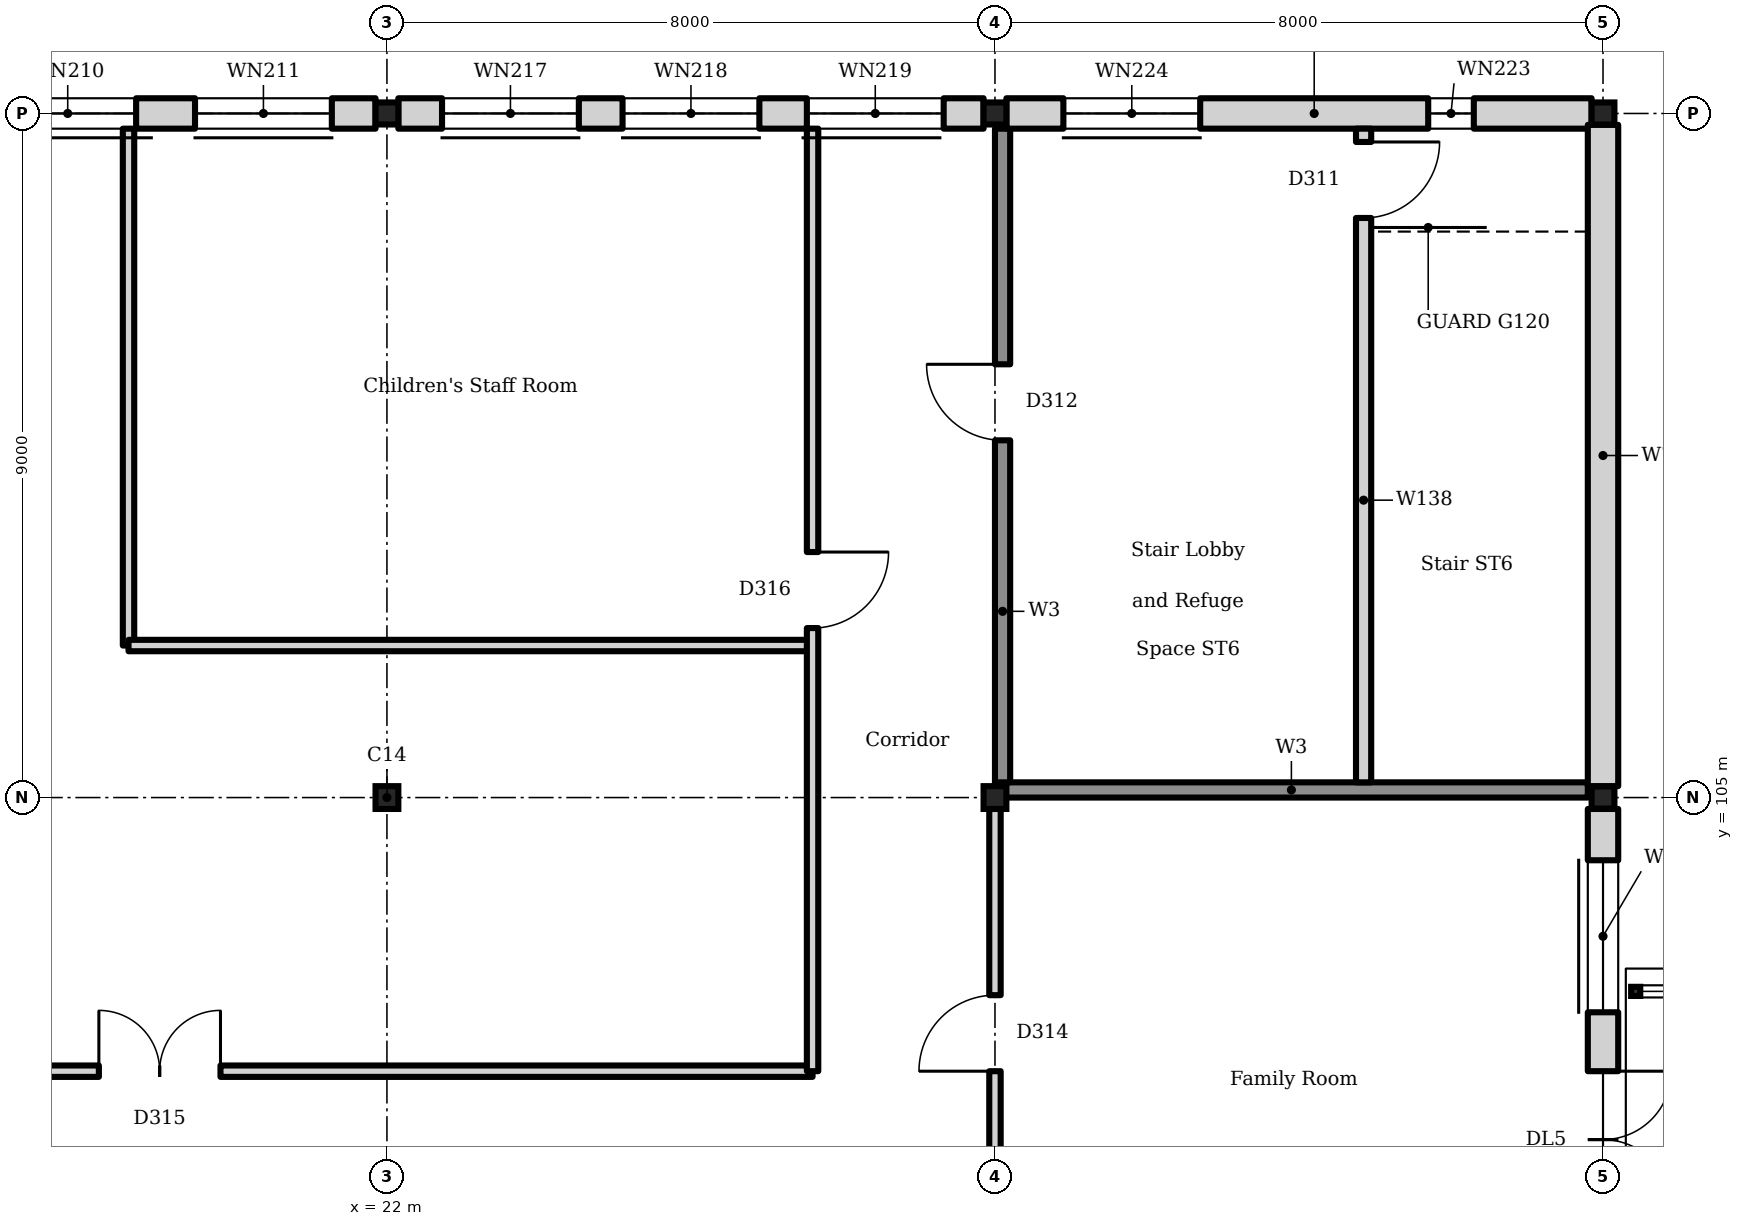
"""IFC4 building model, lengths in metres.
Left out: names, types, materials, properties, quantities, classifications, styles, units other than length and angle.
Written with IfcOpenShell. Run it as: python <this file> out.ifc"""

import sys

from ifc_helpers import new_model, si_unit, direction, frame, frame_2d, origin, origin_2d, place, context, subcontext, project, spatial, rectangle, i_section, extrude, element, fill, save


model = new_model("IFC4")
c1 = context("Model", 3, precision=1e-05, world=origin(), true_north=direction((0.0, 1.0)))
c2 = subcontext(c1, "Body", "Model", "MODEL_VIEW")
j1 = project(units=[si_unit("LENGTHUNIT", "METRE"), si_unit("PLANEANGLEUNIT", "RADIAN")], contexts=[c1])
p1 = place(None, origin())
s1 = spatial("IfcSite", under=j1, at=p1, CompositionType="ELEMENT")
p2 = place(p1, origin())
s2 = spatial("IfcBuilding", under=s1, at=p2, CompositionType="ELEMENT")
p3 = place(p2, frame((0.0, 0.0, 9.9)))
s3 = spatial("IfcBuildingStorey", under=s2, at=p3, CompositionType="ELEMENT", Elevation=9.9)
p4 = place(p3, frame((22.0, 105.0, 0.0), z_axis=(0.0, 0.0, 1.0), x_axis=(1.0, 0.0, 0.0)))
e1 = element("IfcColumn", 1, at=p4, inside=s3, PredefinedType="COLUMN", context=c2, shape_type="SweptSolid", body=[
    extrude(i_section(OverallWidth=0.3, OverallDepth=0.3, WebThickness=0.011, FlangeThickness=0.019, FilletRadius=0.027, at=origin_2d()), origin(), (0.0, 0.0, 1.0), 4.5),
])
p5 = place(p3, frame((22.0, 114.0, 0.0), z_axis=(0.0, 0.0, 1.0), x_axis=(1.0, 0.0, 0.0)))
e2 = element("IfcColumn", 2, at=p5, inside=s3, PredefinedType="COLUMN", context=c2, shape_type="SweptSolid", body=[
    extrude(i_section(OverallWidth=0.3, OverallDepth=0.29, WebThickness=0.009, FlangeThickness=0.014, FilletRadius=0.027, at=origin_2d()), origin(), (0.0, 0.0, 1.0), 4.5),
])
p6 = place(p3, frame((30.0, 105.0, 0.0), z_axis=(0.0, 0.0, 1.0), x_axis=(1.0, 0.0, 0.0)))
e3 = element("IfcColumn", 3, at=p6, inside=s3, PredefinedType="COLUMN", context=c2, shape_type="SweptSolid", body=[
    extrude(i_section(OverallWidth=0.3, OverallDepth=0.3, WebThickness=0.011, FlangeThickness=0.019, FilletRadius=0.027, at=origin_2d()), origin(), (0.0, 0.0, 1.0), 4.5),
])
for number, where, z_axis, x_axis in (
    (4, (30.0, 114.0, 0.0), (0.0, 0.0, 1.0), (1.0, 0.0, 0.0)),
    (5, (38.0, 105.0, 0.0), (0.0, 0.0, 1.0), (1.0, 0.0, 0.0)),
    (6, (38.0, 114.0, 0.0), (0.0, 0.0, 1.0), (1.0, 0.0, 0.0)),
):
    element("IfcColumn", number, at=place(p3, frame(where, z_axis=z_axis, x_axis=x_axis)), inside=s3, PredefinedType="COLUMN", context=c2, shape_type="SweptSolid", body=[
        extrude(i_section(OverallWidth=0.3, OverallDepth=0.29, WebThickness=0.009, FlangeThickness=0.014, FilletRadius=0.027, at=origin_2d()), origin(), (0.0, 0.0, 1.0), 4.5),
    ])
p7 = place(p3, frame((14.15, 114.0, 0.0), z_axis=(0.0, 0.0, 1.0), x_axis=(1.0, 0.0, 0.0)))
e7 = element("IfcWall", 7, at=p7, inside=s3, PredefinedType="SOLIDWALL", context=c2, shape_type="SweptSolid", body=[
    extrude(rectangle(XDim=7.7, YDim=0.4, at=frame_2d((3.85, 0.0))), origin(), (0.0, 0.0, 1.0), 3.93),
])
p8 = place(p7, frame((0.575, 0.0, 0.45)))
e8 = element("IfcOpeningElement", 8, at=p8, cuts=e7, PredefinedType="OPENING", context=c2, shape_type="SweptSolid", body=[
    extrude(rectangle(XDim=1.8, YDim=3.0, at=frame_2d((0.9, 1.5))), frame((0.0, 0.21, 0.0), z_axis=(0.0, -1.0, 0.0), x_axis=(1.0, 0.0, 0.0)), (0.0, 0.0, 1.0), 0.42),
])
p9 = place(p7, frame((2.75, 0.0, 0.45)))
e9 = element("IfcOpeningElement", 9, at=p9, cuts=e7, PredefinedType="OPENING", context=c2, shape_type="SweptSolid", body=[
    extrude(rectangle(XDim=1.8, YDim=3.0, at=frame_2d((0.9, 1.5))), frame((0.0, 0.21, 0.0), z_axis=(0.0, -1.0, 0.0), x_axis=(1.0, 0.0, 0.0)), (0.0, 0.0, 1.0), 0.42),
])
p10 = place(p7, frame((5.325, 0.0, 0.45)))
e10 = element("IfcOpeningElement", 10, at=p10, cuts=e7, PredefinedType="OPENING", context=c2, shape_type="SweptSolid", body=[
    extrude(rectangle(XDim=1.8, YDim=3.0, at=frame_2d((0.9, 1.5))), frame((0.0, 0.21, 0.0), z_axis=(0.0, -1.0, 0.0), x_axis=(1.0, 0.0, 0.0)), (0.0, 0.0, 1.0), 0.42),
])
p11 = place(p3, frame((22.15, 114.0, 0.0), z_axis=(0.0, 0.0, 1.0), x_axis=(1.0, 0.0, 0.0)))
e11 = element("IfcWall", 11, at=p11, inside=s3, PredefinedType="SOLIDWALL", context=c2, shape_type="SweptSolid", body=[
    extrude(rectangle(XDim=7.7, YDim=0.4, at=frame_2d((3.85, 0.0))), origin(), (0.0, 0.0, 1.0), 3.93),
])
p12 = place(p11, frame((0.575, 0.0, 0.45)))
e12 = element("IfcOpeningElement", 12, at=p12, cuts=e11, PredefinedType="OPENING", context=c2, shape_type="SweptSolid", body=[
    extrude(rectangle(XDim=1.8, YDim=3.0, at=frame_2d((0.9, 1.5))), frame((0.0, 0.21, 0.0), z_axis=(0.0, -1.0, 0.0), x_axis=(1.0, 0.0, 0.0)), (0.0, 0.0, 1.0), 0.42),
])
p13 = place(p11, frame((2.95, 0.0, 0.45)))
e13 = element("IfcOpeningElement", 13, at=p13, cuts=e11, PredefinedType="OPENING", context=c2, shape_type="SweptSolid", body=[
    extrude(rectangle(XDim=1.8, YDim=3.0, at=frame_2d((0.9, 1.5))), frame((0.0, 0.21, 0.0), z_axis=(0.0, -1.0, 0.0), x_axis=(1.0, 0.0, 0.0)), (0.0, 0.0, 1.0), 0.42),
])
p14 = place(p11, frame((5.375, 0.0, 0.45)))
e14 = element("IfcOpeningElement", 14, at=p14, cuts=e11, PredefinedType="OPENING", context=c2, shape_type="SweptSolid", body=[
    extrude(rectangle(XDim=1.8, YDim=3.0, at=frame_2d((0.9, 1.5))), frame((0.0, 0.21, 0.0), z_axis=(0.0, -1.0, 0.0), x_axis=(1.0, 0.0, 0.0)), (0.0, 0.0, 1.0), 0.42),
])
p15 = place(p3, frame((30.15, 114.0, 0.0), z_axis=(0.0, 0.0, 1.0), x_axis=(1.0, 0.0, 0.0)))
e15 = element("IfcWall", 15, at=p15, inside=s3, PredefinedType="SOLIDWALL", context=c2, shape_type="SweptSolid", body=[
    extrude(rectangle(XDim=7.7, YDim=0.4, at=frame_2d((3.85, 0.0))), origin(), (0.0, 0.0, 1.0), 3.93),
])
p16 = place(p15, frame((5.55, 0.0, 1.0)))
e16 = element("IfcOpeningElement", 16, at=p16, cuts=e15, PredefinedType="OPENING", context=c2, shape_type="SweptSolid", body=[
    extrude(rectangle(XDim=0.6, YDim=2.4, at=frame_2d((0.3, 1.2))), frame((0.0, 0.21, 0.0), z_axis=(0.0, -1.0, 0.0), x_axis=(1.0, 0.0, 0.0)), (0.0, 0.0, 1.0), 0.42),
])
p17 = place(p15, frame((0.75, 0.0, 0.45)))
e17 = element("IfcOpeningElement", 17, at=p17, cuts=e15, PredefinedType="OPENING", context=c2, shape_type="SweptSolid", body=[
    extrude(rectangle(XDim=1.8, YDim=3.0, at=frame_2d((0.9, 1.5))), frame((0.0, 0.21, 0.0), z_axis=(0.0, -1.0, 0.0), x_axis=(1.0, 0.0, 0.0)), (0.0, 0.0, 1.0), 0.42),
])
p18 = place(p3, frame((38.0, 96.15, 0.0), z_axis=(0.0, 0.0, 1.0), x_axis=(0.0, 1.0, 0.0)))
e18 = element("IfcWall", 18, at=p18, inside=s3, PredefinedType="SOLIDWALL", context=c2, shape_type="SweptSolid", body=[
    extrude(rectangle(XDim=8.7, YDim=0.4, at=frame_2d((4.35, 0.0))), origin(), (0.0, 0.0, 1.0), 3.88),
])
p19 = place(p18, frame((0.675, 0.0, 0.45)))
e19 = element("IfcOpeningElement", 19, at=p19, cuts=e18, PredefinedType="OPENING", context=c2, shape_type="SweptSolid", body=[
    extrude(rectangle(XDim=2.0, YDim=3.0, at=frame_2d((1.0, 1.5))), frame((0.0, 0.21, 0.0), z_axis=(0.0, -1.0, 0.0), x_axis=(1.0, 0.0, 0.0)), (0.0, 0.0, 1.0), 0.42),
])
p20 = place(p18, frame((3.45, 0.0, 0.0)))
e20 = element("IfcOpeningElement", 20, at=p20, cuts=e18, PredefinedType="OPENING", context=c2, shape_type="SweptSolid", body=[
    extrude(rectangle(XDim=1.8, YDim=2.4, at=frame_2d((0.9, 1.2))), frame((0.0, 0.21, 0.0), z_axis=(0.0, -1.0, 0.0), x_axis=(1.0, 0.0, 0.0)), (0.0, 0.0, 1.0), 0.42),
])
p21 = place(p18, frame((6.025, 0.0, 0.45)))
e21 = element("IfcOpeningElement", 21, at=p21, cuts=e18, PredefinedType="OPENING", context=c2, shape_type="SweptSolid", body=[
    extrude(rectangle(XDim=2.0, YDim=3.0, at=frame_2d((1.0, 1.5))), frame((0.0, 0.21, 0.0), z_axis=(0.0, -1.0, 0.0), x_axis=(1.0, 0.0, 0.0)), (0.0, 0.0, 1.0), 0.42),
])
p22 = place(p3, frame((38.0, 105.15, 0.0), z_axis=(0.0, 0.0, 1.0), x_axis=(0.0, 1.0, 0.0)))
e22 = element("IfcWall", 22, at=p22, inside=s3, PredefinedType="SOLIDWALL", context=c2, shape_type="SweptSolid", body=[
    extrude(rectangle(XDim=8.7, YDim=0.4, at=frame_2d((4.35, 0.0))), origin(), (0.0, 0.0, 1.0), 3.88),
])
p23 = place(p3, frame((34.85, 105.2, 0.0), z_axis=(0.0, 0.0, 1.0), x_axis=(0.0, 1.0, 0.0)))
e23 = element("IfcWall", 23, at=p23, inside=s3, PredefinedType="SOLIDWALL", context=c2, shape_type="SweptSolid", body=[
    extrude(rectangle(XDim=8.6, YDim=0.2, at=frame_2d((4.3, 0.0))), origin(), (0.0, 0.0, 1.0), 4.35),
])
p24 = place(p23, frame((7.425, 0.0, 0.0)))
e24 = element("IfcOpeningElement", 24, at=p24, cuts=e23, PredefinedType="OPENING", context=c2, shape_type="SweptSolid", body=[
    extrude(rectangle(XDim=1.0, YDim=2.1, at=frame_2d((0.5, 1.05))), frame((0.0, 0.11, 0.0), z_axis=(0.0, -1.0, 0.0), x_axis=(1.0, 0.0, 0.0)), (0.0, 0.0, 1.0), 0.22),
])
p25 = place(p3, frame((30.0, 105.1, 0.0), z_axis=(0.0, 0.0, 1.0), x_axis=(1.0, 0.0, 0.0)))
e25 = element("IfcWall", 25, at=p25, inside=s3, PredefinedType="SOLIDWALL", context=c2, shape_type="SweptSolid", body=[
    extrude(rectangle(XDim=7.8, YDim=0.2, at=frame_2d((3.9, 0.0))), origin(), (0.0, 0.0, 1.0), 3.91),
])
p26 = place(p3, frame((30.1, 105.2, 0.0), z_axis=(0.0, 0.0, 1.0), x_axis=(0.0, 1.0, 0.0)))
e26 = element("IfcWall", 26, at=p26, inside=s3, PredefinedType="SOLIDWALL", context=c2, shape_type="SweptSolid", body=[
    extrude(rectangle(XDim=8.6, YDim=0.2, at=frame_2d((4.3, 0.0))), origin(), (0.0, 0.0, 1.0), 3.91),
])
p27 = place(p26, frame((4.5, 0.0, 0.0)))
e27 = element("IfcOpeningElement", 27, at=p27, cuts=e26, PredefinedType="OPENING", context=c2, shape_type="SweptSolid", body=[
    extrude(rectangle(XDim=1.0, YDim=2.1, at=frame_2d((0.5, 1.05))), frame((0.0, 0.11, 0.0), z_axis=(0.0, -1.0, 0.0), x_axis=(1.0, 0.0, 0.0)), (0.0, 0.0, 1.0), 0.22),
])
p28 = place(p3, frame((10.4, 101.4, 0.0), z_axis=(0.0, 0.0, 1.0), x_axis=(1.0, 0.0, 0.0)))
e28 = element("IfcWall", 28, at=p28, inside=s3, PredefinedType="PARTITIONING", context=c2, shape_type="SweptSolid", body=[
    extrude(rectangle(XDim=17.2, YDim=0.15, at=frame_2d((8.6, 0.0))), origin(), (0.0, 0.0, 1.0), 3.91),
])
p29 = place(p28, frame((7.81, 0.0, 0.0)))
e29 = element("IfcOpeningElement", 29, at=p29, cuts=e28, PredefinedType="OPENING", context=c2, shape_type="SweptSolid", body=[
    extrude(rectangle(XDim=1.6, YDim=2.1, at=frame_2d((0.8, 1.05))), frame((0.0, 0.085, 0.0), z_axis=(0.0, -1.0, 0.0), x_axis=(1.0, 0.0, 0.0)), (0.0, 0.0, 1.0), 0.17),
])
p30 = place(p3, frame((18.6, 107.0, 0.0), z_axis=(0.0, 0.0, 1.0), x_axis=(0.0, 1.0, 0.0)))
e30 = element("IfcWall", 30, at=p30, inside=s3, PredefinedType="PARTITIONING", context=c2, shape_type="SweptSolid", body=[
    extrude(rectangle(XDim=6.8, YDim=0.15, at=frame_2d((3.4, 0.0))), origin(), (0.0, 0.0, 1.0), 4.35),
])
p31 = place(p3, frame((18.6, 107.0, 0.0), z_axis=(0.0, 0.0, 1.0), x_axis=(1.0, 0.0, 0.0)))
e31 = element("IfcWall", 31, at=p31, inside=s3, PredefinedType="PARTITIONING", context=c2, shape_type="SweptSolid", body=[
    extrude(rectangle(XDim=9.0, YDim=0.15, at=frame_2d((4.5, 0.0))), origin(), (0.0, 0.0, 1.0), 3.91),
])
p32 = place(p3, frame((27.6, 101.4, 0.0), z_axis=(0.0, 0.0, 1.0), x_axis=(0.0, 1.0, 0.0)))
e32 = element("IfcWall", 32, at=p32, inside=s3, PredefinedType="PARTITIONING", context=c2, shape_type="SweptSolid", body=[
    extrude(rectangle(XDim=12.4, YDim=0.15, at=frame_2d((6.2, 0.0))), origin(), (0.0, 0.0, 1.0), 3.96),
])
p33 = place(p32, frame((5.83, 0.0, 0.0)))
e33 = element("IfcOpeningElement", 33, at=p33, cuts=e32, PredefinedType="OPENING", context=c2, shape_type="SweptSolid", body=[
    extrude(rectangle(XDim=1.0, YDim=2.1, at=frame_2d((0.5, 1.05))), frame((0.0, 0.085, 0.0), z_axis=(0.0, -1.0, 0.0), x_axis=(1.0, 0.0, 0.0)), (0.0, 0.0, 1.0), 0.17),
])
p34 = place(p3, frame((30.0, 99.0, 0.0), z_axis=(0.0, 0.0, 1.0), x_axis=(0.0, 1.0, 0.0)))
e34 = element("IfcWall", 34, at=p34, inside=s3, PredefinedType="PARTITIONING", context=c2, shape_type="SweptSolid", body=[
    extrude(rectangle(XDim=5.85, YDim=0.15, at=frame_2d((2.925, 0.0))), origin(), (0.0, 0.0, 1.0), 3.91),
])
p35 = place(p34, frame((2.4, 0.0, 0.0)))
e35 = element("IfcOpeningElement", 35, at=p35, cuts=e34, PredefinedType="OPENING", context=c2, shape_type="SweptSolid", body=[
    extrude(rectangle(XDim=1.0, YDim=2.1, at=frame_2d((0.5, 1.05))), frame((0.0, 0.085, 0.0), z_axis=(0.0, -1.0, 0.0), x_axis=(1.0, 0.0, 0.0)), (0.0, 0.0, 1.0), 0.17),
])
p36 = place(p9, origin())
e36 = element("IfcWindow", 36, at=p36, inside=s3, PartitioningType="SINGLE_PANEL", PredefinedType="WINDOW", context=c2, shape_type="SweptSolid", body=[
    extrude(rectangle(XDim=1.8, YDim=3.0, at=frame_2d((0.9, 1.5))), frame((0.0, 0.03, 0.0), z_axis=(0.0, -1.0, 0.0), x_axis=(1.0, 0.0, 0.0)), (0.0, 0.0, 1.0), 0.06),
])
fill(e9, e36)
p37 = place(p10, origin())
e37 = element("IfcWindow", 37, at=p37, inside=s3, PartitioningType="SINGLE_PANEL", PredefinedType="WINDOW", context=c2, shape_type="SweptSolid", body=[
    extrude(rectangle(XDim=1.8, YDim=3.0, at=frame_2d((0.9, 1.5))), frame((0.0, 0.03, 0.0), z_axis=(0.0, -1.0, 0.0), x_axis=(1.0, 0.0, 0.0)), (0.0, 0.0, 1.0), 0.06),
])
fill(e10, e37)
p38 = place(p12, origin())
e38 = element("IfcWindow", 38, at=p38, inside=s3, PartitioningType="SINGLE_PANEL", PredefinedType="WINDOW", context=c2, shape_type="SweptSolid", body=[
    extrude(rectangle(XDim=1.8, YDim=3.0, at=frame_2d((0.9, 1.5))), frame((0.0, 0.03, 0.0), z_axis=(0.0, -1.0, 0.0), x_axis=(1.0, 0.0, 0.0)), (0.0, 0.0, 1.0), 0.06),
])
fill(e12, e38)
p39 = place(p13, origin())
e39 = element("IfcWindow", 39, at=p39, inside=s3, PartitioningType="SINGLE_PANEL", PredefinedType="WINDOW", context=c2, shape_type="SweptSolid", body=[
    extrude(rectangle(XDim=1.8, YDim=3.0, at=frame_2d((0.9, 1.5))), frame((0.0, 0.03, 0.0), z_axis=(0.0, -1.0, 0.0), x_axis=(1.0, 0.0, 0.0)), (0.0, 0.0, 1.0), 0.06),
])
fill(e13, e39)
p40 = place(p14, origin())
e40 = element("IfcWindow", 40, at=p40, inside=s3, PartitioningType="SINGLE_PANEL", PredefinedType="WINDOW", context=c2, shape_type="SweptSolid", body=[
    extrude(rectangle(XDim=1.8, YDim=3.0, at=frame_2d((0.9, 1.5))), frame((0.0, 0.03, 0.0), z_axis=(0.0, -1.0, 0.0), x_axis=(1.0, 0.0, 0.0)), (0.0, 0.0, 1.0), 0.06),
])
fill(e14, e40)
p41 = place(p16, origin())
e41 = element("IfcWindow", 41, at=p41, inside=s3, PartitioningType="SINGLE_PANEL", PredefinedType="WINDOW", context=c2, shape_type="SweptSolid", body=[
    extrude(rectangle(XDim=0.6, YDim=2.4, at=frame_2d((0.3, 1.2))), frame((0.0, 0.03, 0.0), z_axis=(0.0, -1.0, 0.0), x_axis=(1.0, 0.0, 0.0)), (0.0, 0.0, 1.0), 0.06),
])
fill(e16, e41)
p42 = place(p17, origin())
e42 = element("IfcWindow", 42, at=p42, inside=s3, PartitioningType="SINGLE_PANEL", PredefinedType="WINDOW", context=c2, shape_type="SweptSolid", body=[
    extrude(rectangle(XDim=1.8, YDim=3.0, at=frame_2d((0.9, 1.5))), frame((0.0, 0.03, 0.0), z_axis=(0.0, -1.0, 0.0), x_axis=(1.0, 0.0, 0.0)), (0.0, 0.0, 1.0), 0.06),
])
fill(e17, e42)
p43 = place(p20, frame((1.8, 0.0, 0.0), z_axis=(0.0, 0.0, 1.0), x_axis=(-1.0, 0.0, 0.0)))
e43 = element("IfcDoor", 43, at=p43, inside=s3, OperationType="DOUBLE_DOOR_SINGLE_SWING", PredefinedType="DOOR", context=c2, shape_type="SweptSolid", body=[
    extrude(rectangle(XDim=1.8, YDim=2.4, at=frame_2d((0.9, 1.2))), frame((0.0, 0.025, 0.0), z_axis=(0.0, -1.0, 0.0), x_axis=(1.0, 0.0, 0.0)), (0.0, 0.0, 1.0), 0.05),
])
fill(e20, e43)
p44 = place(p21, origin())
e44 = element("IfcWindow", 44, at=p44, inside=s3, PartitioningType="SINGLE_PANEL", PredefinedType="WINDOW", context=c2, shape_type="SweptSolid", body=[
    extrude(rectangle(XDim=2.0, YDim=3.0, at=frame_2d((1.0, 1.5))), frame((0.0, 0.03, 0.0), z_axis=(0.0, -1.0, 0.0), x_axis=(1.0, 0.0, 0.0)), (0.0, 0.0, 1.0), 0.06),
])
fill(e21, e44)
p45 = place(p24, frame((1.0, 0.0, 0.0), z_axis=(0.0, 0.0, 1.0), x_axis=(-1.0, 0.0, 0.0)))
e45 = element("IfcDoor", 45, at=p45, inside=s3, OperationType="SINGLE_SWING_RIGHT", PredefinedType="DOOR", context=c2, shape_type="SweptSolid", body=[
    extrude(rectangle(XDim=1.0, YDim=2.1, at=frame_2d((0.5, 1.05))), frame((0.0, 0.025, 0.0), z_axis=(0.0, -1.0, 0.0), x_axis=(1.0, 0.0, 0.0)), (0.0, 0.0, 1.0), 0.05),
])
fill(e24, e45)
p46 = place(p27, origin())
e46 = element("IfcDoor", 46, at=p46, inside=s3, OperationType="SINGLE_SWING_LEFT", PredefinedType="DOOR", context=c2, shape_type="SweptSolid", body=[
    extrude(rectangle(XDim=1.0, YDim=2.1, at=frame_2d((0.5, 1.05))), frame((0.0, 0.025, 0.0), z_axis=(0.0, -1.0, 0.0), x_axis=(1.0, 0.0, 0.0)), (0.0, 0.0, 1.0), 0.05),
])
fill(e27, e46)
p47 = place(p35, origin())
e47 = element("IfcDoor", 47, at=p47, inside=s3, OperationType="SINGLE_SWING_RIGHT", PredefinedType="DOOR", context=c2, shape_type="SweptSolid", body=[
    extrude(rectangle(XDim=1.0, YDim=2.1, at=frame_2d((0.5, 1.05))), frame((0.0, 0.025, 0.0), z_axis=(0.0, -1.0, 0.0), x_axis=(1.0, 0.0, 0.0)), (0.0, 0.0, 1.0), 0.05),
])
fill(e35, e47)
p48 = place(p29, origin())
e48 = element("IfcDoor", 48, at=p48, inside=s3, OperationType="DOUBLE_DOOR_SINGLE_SWING", PredefinedType="DOOR", context=c2, shape_type="SweptSolid", body=[
    extrude(rectangle(XDim=1.6, YDim=2.1, at=frame_2d((0.8, 1.05))), frame((0.0, 0.025, 0.0), z_axis=(0.0, -1.0, 0.0), x_axis=(1.0, 0.0, 0.0)), (0.0, 0.0, 1.0), 0.05),
])
fill(e29, e48)
p49 = place(p33, frame((1.0, 0.0, 0.0), z_axis=(0.0, 0.0, 1.0), x_axis=(-1.0, 0.0, 0.0)))
e49 = element("IfcDoor", 49, at=p49, inside=s3, OperationType="SINGLE_SWING_RIGHT", PredefinedType="DOOR", context=c2, shape_type="SweptSolid", body=[
    extrude(rectangle(XDim=1.0, YDim=2.1, at=frame_2d((0.5, 1.05))), frame((0.0, 0.025, 0.0), z_axis=(0.0, -1.0, 0.0), x_axis=(1.0, 0.0, 0.0)), (0.0, 0.0, 1.0), 0.05),
])
fill(e33, e49)
save(model, sys.argv[1])
